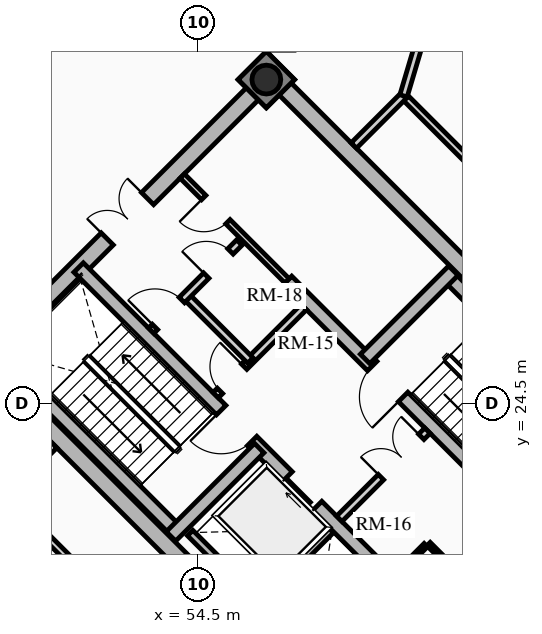
"""IFC4 building model, lengths in metres.
Left out: names, types, materials, properties, quantities, classifications, styles, units other than length and angle.
Written with IfcOpenShell. Run it as: python <this file> out.ifc"""

import sys

from ifc_helpers import new_model, si_unit, direction, frame, frame_2d, origin, origin_2d, place, context, subcontext, project, spatial, rectangle, hollow_circle, extrude, source, transform, mapped, element, fill, save


model = new_model("IFC4")
c1 = context("Model", 3, precision=1e-05, world=origin(), true_north=direction((0.0, 1.0)))
c2 = subcontext(c1, "Body", "Model", "MODEL_VIEW")
j1 = project(units=[si_unit("LENGTHUNIT", "METRE"), si_unit("PLANEANGLEUNIT", "RADIAN")], contexts=[c1])
p1 = place(None, origin())
s1 = spatial("IfcSite", under=j1, at=p1, CompositionType="ELEMENT")
p2 = place(p1, origin())
s2 = spatial("IfcBuilding", under=s1, at=p2, CompositionType="ELEMENT")
p3 = place(p2, frame((0.0, 0.0, 147.1)))
s3 = spatial("IfcBuildingStorey", under=s2, at=p3, CompositionType="ELEMENT", Elevation=147.1)
for number, where, z_axis, x_axis in (
    (1, (58.737, 15.697, 0.0), (0.0, 0.0, 1.0), (-0.707, 0.707, 0.0)),
    (2, (66.303, 23.263, 0.0), (0.0, 0.0, 1.0), (-0.707, 0.707, 0.0)),
):
    element("IfcWall", number, at=place(p3, frame(where, z_axis=z_axis, x_axis=x_axis)), inside=s3, PredefinedType="SHEAR", context=c2, shape_type="SweptSolid", body=[
        extrude(rectangle(XDim=14.2, YDim=0.45, at=frame_2d((7.1, 0.0))), origin(), (0.0, 0.0, 1.0), 4.5),
    ])
p4 = place(p3, frame((58.578, 15.856, 0.0), z_axis=(0.0, 0.0, 1.0), x_axis=(0.707106781187, 0.707106781187, 0.0)))
e3 = element("IfcWall", 3, at=p4, inside=s3, PredefinedType="SHEAR", context=c2, shape_type="SweptSolid", body=[
    extrude(rectangle(XDim=10.7, YDim=0.45, at=frame_2d((5.35, 0.0))), origin(), (0.0, 0.0, 1.0), 4.5),
])
m1 = source(origin(), c2, "Body", "SweptSolid", [
    extrude(rectangle(XDim=1.5, YDim=2.02, at=frame_2d((0.75, 1.01))), frame((0.0, 0.235, 0.0), z_axis=(0.0, -1.0, 0.0), x_axis=(1.0, 0.0, 0.0)), (0.0, 0.0, 1.0), 0.47),
])
p5 = place(p4, frame((5.45, 0.0, 0.0)))
e4 = element("IfcOpeningElement", 4, at=p5, cuts=e3, PredefinedType="OPENING", context=c2, shape_type="MappedRepresentation", body=[
    mapped(m1, transform((0.0, 0.0, 0.0), x_axis=(1.0, 0.0, 0.0), y_axis=(0.0, 1.0, 0.0), z_axis=(0.0, 0.0, 1.0), scale=1.0)),
])
p6 = place(p3, frame((48.856, 25.578, 0.0), z_axis=(0.0, 0.0, 1.0), x_axis=(0.707106781187, 0.707106781187, 0.0)))
e5 = element("IfcWall", 5, at=p6, inside=s3, PredefinedType="SHEAR", context=c2, shape_type="SweptSolid", body=[
    extrude(rectangle(XDim=10.7, YDim=0.45, at=frame_2d((5.35, 0.0))), origin(), (0.0, 0.0, 1.0), 4.5),
])
p7 = place(p6, frame((4.6, 0.0, 0.0)))
e6 = element("IfcOpeningElement", 6, at=p7, cuts=e5, PredefinedType="OPENING", context=c2, shape_type="MappedRepresentation", body=[
    mapped(m1, transform((0.0, 0.0, 0.0), x_axis=(1.0, 0.0, 0.0), y_axis=(0.0, 1.0, 0.0), z_axis=(0.0, 0.0, 1.0), scale=1.0)),
])
p8 = place(p3, frame((61.078, 18.355, 0.0), z_axis=(0.0, 0.0, 1.0), x_axis=(-0.707106781187, 0.707106781187, 0.0)))
e7 = element("IfcWall", 7, at=p8, inside=s3, PredefinedType="SHEAR", context=c2, shape_type="SweptSolid", body=[
    extrude(rectangle(XDim=13.75, YDim=0.35, at=frame_2d((6.875, 0.0))), origin(), (0.0, 0.0, 1.0), 4.5),
])
m2 = source(origin(), c2, "Body", "SweptSolid", [
    extrude(rectangle(XDim=1.1, YDim=2.015, at=frame_2d((0.55, 1.007))), frame((0.0, 0.185, 0.0), z_axis=(0.0, -1.0, 0.0), x_axis=(1.0, 0.0, 0.0)), (0.0, 0.0, 1.0), 0.37),
])
p9 = place(p8, frame((4.875, 0.0, 0.0)))
e8 = element("IfcOpeningElement", 8, at=p9, cuts=e7, PredefinedType="OPENING", context=c2, shape_type="MappedRepresentation", body=[
    mapped(m2, transform((0.0, 0.0, 0.0), x_axis=(1.0, 0.0, 0.0), y_axis=(0.0, 1.0, 0.0), z_axis=(0.0, 0.0, 1.0), scale=1.0)),
])
m3 = source(origin(), c2, "Body", "SweptSolid", [
    extrude(rectangle(XDim=1.15, YDim=2.02, at=frame_2d((0.575, 1.01))), frame((0.0, 0.185, 0.0), z_axis=(0.0, -1.0, 0.0), x_axis=(1.0, 0.0, 0.0)), (0.0, 0.0, 1.0), 0.37),
])
p10 = place(p8, frame((7.295, 0.0, 0.0)))
e9 = element("IfcOpeningElement", 9, at=p10, cuts=e7, PredefinedType="OPENING", context=c2, shape_type="MappedRepresentation", body=[
    mapped(m3, transform((0.0, 0.0, 0.0), x_axis=(1.0, 0.0, 0.0), y_axis=(0.0, 1.0, 0.0), z_axis=(0.0, 0.0, 1.0), scale=1.0)),
])
p11 = place(p3, frame((63.645, 20.922, 0.0), z_axis=(0.0, 0.0, 1.0), x_axis=(-0.70711946392, 0.707094098226, 0.0)))
e10 = element("IfcWall", 10, at=p11, inside=s3, PredefinedType="SHEAR", context=c2, shape_type="SweptSolid", body=[
    extrude(rectangle(XDim=9.625, YDim=0.35, at=frame_2d((4.812, 0.0))), origin(), (0.0, 0.0, 1.0), 4.5),
])
p12 = place(p11, frame((5.305, 0.0, 0.0)))
e11 = element("IfcOpeningElement", 11, at=p12, cuts=e10, PredefinedType="OPENING", context=c2, shape_type="MappedRepresentation", body=[
    mapped(m3, transform((0.0, 0.0, 0.0), x_axis=(1.0, 0.0, 0.0), y_axis=(0.0, 1.0, 0.0), z_axis=(0.0, 0.0, 1.0), scale=1.0)),
])
p13 = place(p3, frame((53.922, 21.141, 0.0), z_axis=(0.0, 0.0, 1.0), x_axis=(-0.707088616009, 0.707124945897, 0.0)))
e12 = element("IfcWall", 12, at=p13, inside=s3, PredefinedType="SHEAR", context=c2, shape_type="SweptSolid", body=[
    extrude(rectangle(XDim=6.72, YDim=0.35, at=frame_2d((3.36, 0.0))), origin(), (0.0, 0.0, 1.0), 4.5),
])
p14 = place(p3, frame((53.784, 21.003, 0.0), z_axis=(0.0, 0.0, 1.0), x_axis=(0.707106781187, 0.707106781187, 0.0)))
e13 = element("IfcWall", 13, at=p14, inside=s3, PredefinedType="SHEAR", context=c2, shape_type="SweptSolid", body=[
    extrude(rectangle(XDim=3.285, YDim=0.35, at=frame_2d((1.643, 0.0))), origin(), (0.0, 0.0, 1.0), 4.5),
])
p15 = place(p3, frame((65.83, 23.107, 0.0), z_axis=(0.0, 0.0, 1.0), x_axis=(-0.707088616009, 0.707124945897, 0.0)))
e14 = element("IfcWall", 14, at=p15, inside=s3, PredefinedType="SHEAR", context=c2, shape_type="SweptSolid", body=[
    extrude(rectangle(XDim=6.72, YDim=0.35, at=frame_2d((3.36, 0.0))), origin(), (0.0, 0.0, 1.0), 4.5),
])
p16 = place(p3, frame((58.893, 25.674, 0.0), z_axis=(0.0, 0.0, 1.0), x_axis=(0.707106781187, 0.707106781187, 0.0)))
e15 = element("IfcWall", 15, at=p16, inside=s3, PredefinedType="SHEAR", context=c2, shape_type="SweptSolid", body=[
    extrude(rectangle(XDim=3.285, YDim=0.35, at=frame_2d((1.643, 0.0))), origin(), (0.0, 0.0, 1.0), 4.5),
])
p17 = place(p3, frame((56.294, 33.024, 0.0), z_axis=(0.0, 0.0, 1.0), x_axis=(0.707106781187, 0.707106781187, 0.0)))
e16 = element("IfcColumn", 16, at=p17, inside=s3, PredefinedType="COLUMN", context=c2, shape_type="SweptSolid", body=[
    extrude(hollow_circle(Radius=0.38, WallThickness=0.032, at=origin_2d()), origin(), (0.0, 0.0, 1.0), 4.5),
])
p18 = place(p3, frame((55.888, 19.069, 0.0), z_axis=(0.0, 0.0, 1.0), x_axis=(0.707106781187, 0.707106781187, 0.0)))
e17 = element("IfcWall", 17, at=p18, inside=s3, PredefinedType="SHEAR", context=c2, shape_type="SweptSolid", body=[
    extrude(rectangle(XDim=2.97, YDim=0.2, at=frame_2d((1.485, 0.0))), origin(), (0.0, 0.0, 1.0), 4.5),
])
p19 = place(p3, frame((56.015, 19.366, 0.0), z_axis=(0.0, 0.0, 1.0), x_axis=(-0.707106781187, 0.707106781187, 0.0)))
e18 = element("IfcWall", 18, at=p19, inside=s3, PredefinedType="SHEAR", context=c2, shape_type="SweptSolid", body=[
    extrude(rectangle(XDim=2.44, YDim=0.2, at=frame_2d((1.22, 0.0))), origin(), (0.0, 0.0, 1.0), 4.5),
])
p20 = place(p3, frame((58.214, 21.467, 0.0), z_axis=(0.0, 0.0, 1.0), x_axis=(0.707106781187, 0.707106781187, 0.0)))
e19 = element("IfcWall", 19, at=p20, inside=s3, PredefinedType="PARTITIONING", context=c2, shape_type="SweptSolid", body=[
    extrude(rectangle(XDim=3.28, YDim=0.2, at=frame_2d((1.64, 0.0))), origin(), (0.0, 0.0, 1.0), 4.265),
])
m4 = source(origin(), c2, "Body", "SweptSolid", [
    extrude(rectangle(XDim=1.5, YDim=2.02, at=frame_2d((0.75, 1.01))), frame((0.0, 0.11, 0.0), z_axis=(0.0, -1.0, 0.0), x_axis=(1.0, 0.0, 0.0)), (0.0, 0.0, 1.0), 0.22),
])
p21 = place(p20, frame((1.55, 0.0, 0.0)))
e20 = element("IfcOpeningElement", 20, at=p21, cuts=e19, PredefinedType="OPENING", context=c2, shape_type="MappedRepresentation", body=[
    mapped(m4, transform((0.0, 0.0, 0.0), x_axis=(1.0, 0.0, 0.0), y_axis=(0.0, 1.0, 0.0), z_axis=(0.0, 0.0, 1.0), scale=1.0)),
])
p22 = place(p3, frame((54.961, 24.719, 0.0), z_axis=(0.0, 0.0, 1.0), x_axis=(0.707106781187, 0.707106781187, 0.0)))
e21 = element("IfcWall", 21, at=p22, inside=s3, PredefinedType="PARTITIONING", context=c2, shape_type="SweptSolid", body=[
    extrude(rectangle(XDim=3.28, YDim=0.2, at=frame_2d((1.64, 0.0))), origin(), (0.0, 0.0, 1.0), 4.265),
])
m5 = source(origin(), c2, "Body", "SweptSolid", [
    extrude(rectangle(XDim=0.9, YDim=2.005, at=frame_2d((0.45, 1.002))), frame((0.0, 0.11, 0.0), z_axis=(0.0, -1.0, 0.0), x_axis=(1.0, 0.0, 0.0)), (0.0, 0.0, 1.0), 0.22),
])
p23 = place(p22, frame((0.16, 0.0, 0.0)))
e22 = element("IfcOpeningElement", 22, at=p23, cuts=e21, PredefinedType="OPENING", context=c2, shape_type="MappedRepresentation", body=[
    mapped(m5, transform((0.0, 0.0, 0.0), x_axis=(1.0, 0.0, 0.0), y_axis=(0.0, 1.0, 0.0), z_axis=(0.0, 0.0, 1.0), scale=1.0)),
])
p24 = place(p3, frame((55.874, 25.631, 0.0), z_axis=(0.0, 0.0, 1.0), x_axis=(-0.707157639372, 0.707055919343, 0.0)))
e23 = element("IfcWall", 23, at=p24, inside=s3, PredefinedType="PARTITIONING", context=c2, shape_type="SweptSolid", body=[
    extrude(rectangle(XDim=2.4, YDim=0.2, at=frame_2d((1.2, 0.0))), origin(), (0.0, 0.0, 1.0), 4.265),
])
p25 = place(p3, frame((53.264, 26.416, 0.0), z_axis=(0.0, 0.0, 1.0), x_axis=(0.707106781187, 0.707106781187, 0.0)))
e24 = element("IfcWall", 24, at=p25, inside=s3, PredefinedType="PARTITIONING", context=c2, shape_type="SweptSolid", body=[
    extrude(rectangle(XDim=3.28, YDim=0.2, at=frame_2d((1.64, 0.0))), origin(), (0.0, 0.0, 1.0), 4.265),
])
m6 = source(origin(), c2, "Body", "SweptSolid", [
    extrude(rectangle(XDim=1.0, YDim=2.015, at=frame_2d((0.5, 1.007))), frame((0.0, 0.11, 0.0), z_axis=(0.0, -1.0, 0.0), x_axis=(1.0, 0.0, 0.0)), (0.0, 0.0, 1.0), 0.22),
])
p26 = place(p25, frame((0.14, 0.0, 0.0)))
e25 = element("IfcOpeningElement", 25, at=p26, cuts=e24, PredefinedType="OPENING", context=c2, shape_type="MappedRepresentation", body=[
    mapped(m6, transform((0.0, 0.0, 0.0), x_axis=(1.0, 0.0, 0.0), y_axis=(0.0, 1.0, 0.0), z_axis=(0.0, 0.0, 1.0), scale=1.0)),
])
p27 = place(p25, frame((2.05, 0.0, 0.0)))
e26 = element("IfcOpeningElement", 26, at=p27, cuts=e24, PredefinedType="OPENING", context=c2, shape_type="MappedRepresentation", body=[
    mapped(m5, transform((0.0, 0.0, 0.0), x_axis=(1.0, 0.0, 0.0), y_axis=(0.0, 1.0, 0.0), z_axis=(0.0, 0.0, 1.0), scale=1.0)),
])
p28 = place(p3, frame((61.835, 19.529, 0.0), z_axis=(0.0, 0.0, 1.0), x_axis=(-0.707174592913, 0.707038962956, 0.0)))
e27 = element("IfcWall", 27, at=p28, inside=s3, PredefinedType="PARTITIONING", context=c2, shape_type="SweptSolid", body=[
    extrude(rectangle(XDim=1.8, YDim=0.125, at=frame_2d((0.9, 0.0))), origin(), (0.0, 0.0, 1.0), 4.265),
])
m7 = source(origin(), c2, "Body", "SweptSolid", [
    extrude(rectangle(XDim=0.9, YDim=2.005, at=frame_2d((0.45, 1.002))), frame((0.0, 0.073, 0.0), z_axis=(0.0, -1.0, 0.0), x_axis=(1.0, 0.0, 0.0)), (0.0, 0.0, 1.0), 0.145),
])
p29 = place(p28, frame((0.42, 0.0, 0.0)))
e28 = element("IfcOpeningElement", 28, at=p29, cuts=e27, PredefinedType="OPENING", context=c2, shape_type="MappedRepresentation", body=[
    mapped(m7, transform((0.0, 0.0, 0.0), x_axis=(1.0, 0.0, 0.0), y_axis=(0.0, 1.0, 0.0), z_axis=(0.0, 0.0, 1.0), scale=1.0)),
])
p30 = place(p3, frame((59.713, 19.996, 0.0), z_axis=(0.0, 0.0, 1.0), x_axis=(0.707217726, 0.706995818963, 0.0)))
e29 = element("IfcWall", 29, at=p30, inside=s3, PredefinedType="PARTITIONING", context=c2, shape_type="SweptSolid", body=[
    extrude(rectangle(XDim=1.1, YDim=0.125, at=frame_2d((0.55, 0.0))), origin(), (0.0, 0.0, 1.0), 4.265),
])
p31 = place(p3, frame((56.839, 27.728, 0.0), z_axis=(0.0, 0.0, 1.0), x_axis=(-0.707106781187, 0.707106781187, 0.0)))
e30 = element("IfcWall", 30, at=p31, inside=s3, PredefinedType="PARTITIONING", context=c2, shape_type="SweptSolid", body=[
    extrude(rectangle(XDim=3.9, YDim=0.16, at=frame_2d((1.95, 0.0))), origin(), (0.0, 0.0, 1.0), 4.265),
])
m8 = source(origin(), c2, "Body", "SweptSolid", [
    extrude(rectangle(XDim=0.9, YDim=2.005, at=frame_2d((0.45, 1.002))), frame((0.0, 0.09, 0.0), z_axis=(0.0, -1.0, 0.0), x_axis=(1.0, 0.0, 0.0)), (0.0, 0.0, 1.0), 0.18),
])
p32 = place(p31, frame((2.2, 0.0, 0.0)))
e31 = element("IfcOpeningElement", 31, at=p32, cuts=e30, PredefinedType="OPENING", context=c2, shape_type="MappedRepresentation", body=[
    mapped(m8, transform((0.0, 0.0, 0.0), x_axis=(1.0, 0.0, 0.0), y_axis=(0.0, 1.0, 0.0), z_axis=(0.0, 0.0, 1.0), scale=1.0)),
])
p33 = place(p3, frame((58.419, 13.08, 0.0), z_axis=(0.0, 0.0, 1.0), x_axis=(0.707106781187, 0.707106781187, 0.0)))
e32 = element("IfcWall", 32, at=p33, inside=s3, PredefinedType="PARTITIONING", context=c2, shape_type="SweptSolid", body=[
    extrude(rectangle(XDim=14.85, YDim=0.18, at=frame_2d((7.425, 0.0))), origin(), (0.0, 0.0, 1.0), 3.556),
])
m9 = source(origin(), c2, "Body", "SweptSolid", [
    extrude(rectangle(XDim=1.4, YDim=2.02, at=frame_2d((0.7, 1.01))), frame((0.0, 0.1, 0.0), z_axis=(0.0, -1.0, 0.0), x_axis=(1.0, 0.0, 0.0)), (0.0, 0.0, 1.0), 0.2),
])
p34 = place(p33, frame((6.725, 0.0, 0.0)))
e33 = element("IfcOpeningElement", 33, at=p34, cuts=e32, PredefinedType="OPENING", context=c2, shape_type="MappedRepresentation", body=[
    mapped(m9, transform((0.0, 0.0, 0.0), x_axis=(1.0, 0.0, 0.0), y_axis=(0.0, 1.0, 0.0), z_axis=(0.0, 0.0, 1.0), scale=1.0)),
])
p35 = place(p3, frame((58.419, 13.08, 0.0), z_axis=(0.0, 0.0, 1.0), x_axis=(-0.707106781187, 0.707106781187, 0.0)))
e34 = element("IfcWall", 34, at=p35, inside=s3, PredefinedType="PARTITIONING", context=c2, shape_type="SweptSolid", body=[
    extrude(rectangle(XDim=12.75, YDim=0.18, at=frame_2d((6.375, 0.0))), origin(), (0.0, 0.0, 1.0), 3.556),
])
p36 = place(p35, frame((5.675, 0.0, 0.0)))
e35 = element("IfcOpeningElement", 35, at=p36, cuts=e34, PredefinedType="OPENING", context=c2, shape_type="MappedRepresentation", body=[
    mapped(m9, transform((0.0, 0.0, 0.0), x_axis=(1.0, 0.0, 0.0), y_axis=(0.0, 1.0, 0.0), z_axis=(0.0, 0.0, 1.0), scale=1.0)),
])
p37 = place(p3, frame((68.92, 23.581, 0.0), z_axis=(0.0, 0.0, 1.0), x_axis=(-0.707106781187, 0.707106781187, 0.0)))
e36 = element("IfcWall", 36, at=p37, inside=s3, PredefinedType="PARTITIONING", context=c2, shape_type="SweptSolid", body=[
    extrude(rectangle(XDim=12.75, YDim=0.18, at=frame_2d((6.375, 0.0))), origin(), (0.0, 0.0, 1.0), 3.556),
])
p38 = place(p37, frame((5.675, 0.0, 0.0)))
e37 = element("IfcOpeningElement", 37, at=p38, cuts=e36, PredefinedType="OPENING", context=c2, shape_type="MappedRepresentation", body=[
    mapped(m9, transform((0.0, 0.0, 0.0), x_axis=(1.0, 0.0, 0.0), y_axis=(0.0, 1.0, 0.0), z_axis=(0.0, 0.0, 1.0), scale=1.0)),
])
for number, where, z_axis, x_axis in (
    (38, (49.404, 22.096, 0.0), (0.0, 0.0, 1.0), (0.707, 0.707, 0.0)),
    (39, (58.596, 31.288, 0.0), (0.0, 0.0, 1.0), (0.707, 0.707, 0.0)),
):
    element("IfcWall", number, at=place(p3, frame(where, z_axis=z_axis, x_axis=x_axis)), inside=s3, PredefinedType="PARTITIONING", context=c2, shape_type="SweptSolid", body=[
        extrude(rectangle(XDim=1.85, YDim=0.2, at=frame_2d((0.925, 0.0))), origin(), (0.0, 0.0, 1.0), 4.265),
    ])
p39 = place(p3, frame((59.904, 32.596, 0.0), z_axis=(0.0, 0.0, 1.0), x_axis=(0.284628951368, 0.958637762684, 0.0)))
e40 = element("IfcWall", 40, at=p39, inside=s3, PredefinedType="PARTITIONING", context=c2, shape_type="SweptSolid", body=[
    extrude(rectangle(XDim=6.288, YDim=0.2, at=frame_2d((3.144, 0.0))), origin(), (0.0, 0.0, 1.0), 3.556),
])
m10 = source(origin(), c2, "Body", "SweptSolid", [
    extrude(rectangle(XDim=1.1, YDim=2.015, at=frame_2d((0.55, 1.007))), frame((0.0, 0.025, 0.0), z_axis=(0.0, -1.0, 0.0), x_axis=(1.0, 0.0, 0.0)), (0.0, 0.0, 1.0), 0.05),
])
p40 = place(p9, origin())
e41 = element("IfcDoor", 41, at=p40, inside=s3, OperationType="SLIDING_TO_RIGHT", PredefinedType="DOOR", context=c2, shape_type="MappedRepresentation", body=[
    mapped(m10, transform((0.0, 0.0, 0.0), x_axis=(1.0, 0.0, 0.0), y_axis=(0.0, 1.0, 0.0), z_axis=(0.0, 0.0, 1.0), scale=1.0)),
])
fill(e8, e41)
m11 = source(origin(), c2, "Body", "SweptSolid", [
    extrude(rectangle(XDim=1.15, YDim=2.02, at=frame_2d((0.575, 1.01))), frame((0.0, 0.025, 0.0), z_axis=(0.0, -1.0, 0.0), x_axis=(1.0, 0.0, 0.0)), (0.0, 0.0, 1.0), 0.05),
])
p41 = place(p10, origin())
e42 = element("IfcDoor", 42, at=p41, inside=s3, OperationType="SINGLE_SWING_RIGHT", PredefinedType="DOOR", context=c2, shape_type="MappedRepresentation", body=[
    mapped(m11, transform((0.0, 0.0, 0.0), x_axis=(1.0, 0.0, 0.0), y_axis=(0.0, 1.0, 0.0), z_axis=(0.0, 0.0, 1.0), scale=1.0)),
])
fill(e9, e42)
p42 = place(p12, origin())
e43 = element("IfcDoor", 43, at=p42, inside=s3, OperationType="SINGLE_SWING_LEFT", PredefinedType="DOOR", context=c2, shape_type="MappedRepresentation", body=[
    mapped(m11, transform((0.0, 0.0, 0.0), x_axis=(1.0, 0.0, 0.0), y_axis=(0.0, 1.0, 0.0), z_axis=(0.0, 0.0, 1.0), scale=1.0)),
])
fill(e11, e43)
m12 = source(origin(), c2, "Body", "SweptSolid", [
    extrude(rectangle(XDim=1.5, YDim=2.02, at=frame_2d((0.75, 1.01))), frame((0.0, 0.025, 0.0), z_axis=(0.0, -1.0, 0.0), x_axis=(1.0, 0.0, 0.0)), (0.0, 0.0, 1.0), 0.05),
])
p43 = place(p7, origin())
e44 = element("IfcDoor", 44, at=p43, inside=s3, OperationType="DOUBLE_DOOR_SINGLE_SWING", PredefinedType="DOOR", context=c2, shape_type="MappedRepresentation", body=[
    mapped(m12, transform((0.0, 0.0, 0.0), x_axis=(1.0, 0.0, 0.0), y_axis=(0.0, 1.0, 0.0), z_axis=(0.0, 0.0, 1.0), scale=1.0)),
])
fill(e6, e44)
p44 = place(p21, origin())
e45 = element("IfcDoor", 45, at=p44, inside=s3, OperationType="DOUBLE_DOOR_SINGLE_SWING", PredefinedType="DOOR", context=c2, shape_type="MappedRepresentation", body=[
    mapped(m12, transform((0.0, 0.0, 0.0), x_axis=(1.0, 0.0, 0.0), y_axis=(0.0, 1.0, 0.0), z_axis=(0.0, 0.0, 1.0), scale=1.0)),
])
fill(e20, e45)
m13 = source(origin(), c2, "Body", "SweptSolid", [
    extrude(rectangle(XDim=0.9, YDim=2.005, at=frame_2d((0.45, 1.002))), frame((0.0, 0.025, 0.0), z_axis=(0.0, -1.0, 0.0), x_axis=(1.0, 0.0, 0.0)), (0.0, 0.0, 1.0), 0.05),
])
p45 = place(p23, origin())
e46 = element("IfcDoor", 46, at=p45, inside=s3, OperationType="SINGLE_SWING_RIGHT", PredefinedType="DOOR", context=c2, shape_type="MappedRepresentation", body=[
    mapped(m13, transform((0.0, 0.0, 0.0), x_axis=(1.0, 0.0, 0.0), y_axis=(0.0, 1.0, 0.0), z_axis=(0.0, 0.0, 1.0), scale=1.0)),
])
fill(e22, e46)
m14 = source(origin(), c2, "Body", "SweptSolid", [
    extrude(rectangle(XDim=1.0, YDim=2.015, at=frame_2d((0.5, 1.007))), frame((0.0, 0.025, 0.0), z_axis=(0.0, -1.0, 0.0), x_axis=(1.0, 0.0, 0.0)), (0.0, 0.0, 1.0), 0.05),
])
p46 = place(p26, origin())
e47 = element("IfcDoor", 47, at=p46, inside=s3, OperationType="SINGLE_SWING_LEFT", PredefinedType="DOOR", context=c2, shape_type="MappedRepresentation", body=[
    mapped(m14, transform((0.0, 0.0, 0.0), x_axis=(1.0, 0.0, 0.0), y_axis=(0.0, 1.0, 0.0), z_axis=(0.0, 0.0, 1.0), scale=1.0)),
])
fill(e25, e47)
p47 = place(p27, origin())
e48 = element("IfcDoor", 48, at=p47, inside=s3, OperationType="SINGLE_SWING_LEFT", PredefinedType="DOOR", context=c2, shape_type="MappedRepresentation", body=[
    mapped(m13, transform((0.0, 0.0, 0.0), x_axis=(1.0, 0.0, 0.0), y_axis=(0.0, 1.0, 0.0), z_axis=(0.0, 0.0, 1.0), scale=1.0)),
])
fill(e26, e48)
p48 = place(p32, origin())
e49 = element("IfcDoor", 49, at=p48, inside=s3, OperationType="SINGLE_SWING_RIGHT", PredefinedType="DOOR", context=c2, shape_type="MappedRepresentation", body=[
    mapped(m13, transform((0.0, 0.0, 0.0), x_axis=(1.0, 0.0, 0.0), y_axis=(0.0, 1.0, 0.0), z_axis=(0.0, 0.0, 1.0), scale=1.0)),
])
fill(e31, e49)
save(model, sys.argv[1])
